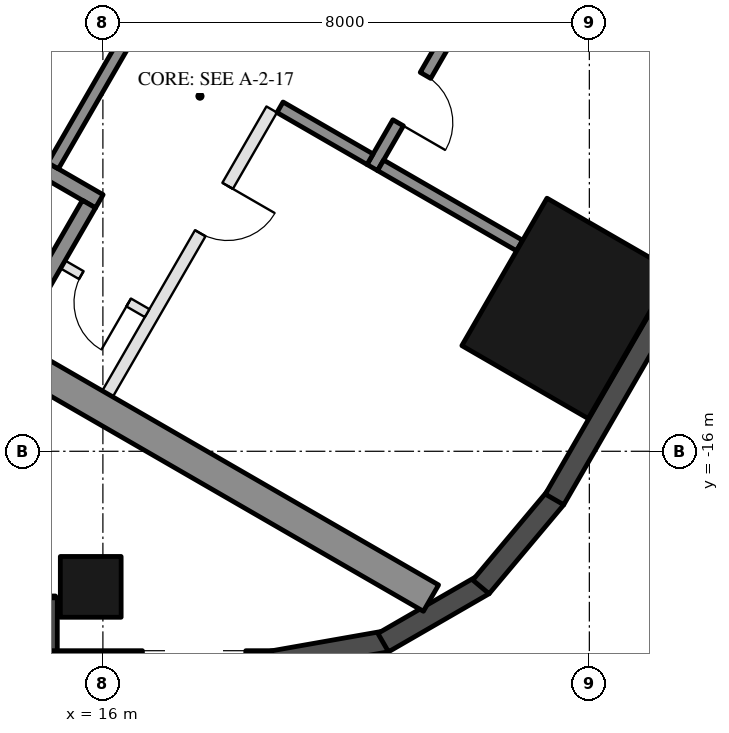
"""IFC4 building model, lengths in metres.
Left out: names, types, materials, properties, quantities, classifications, styles, units other than length and angle.
Written with IfcOpenShell. Run it as: python <this file> out.ifc"""

import sys

from ifc_helpers import new_model, si_unit, direction, frame, frame_2d, origin, origin_2d, place, context, subcontext, project, spatial, rectangle, hollow_rectangle, extrude, element, fill, save


model = new_model("IFC4")
c1 = context("Model", 3, precision=1e-05, world=origin(), true_north=direction((0.0, 1.0)))
c2 = subcontext(c1, "Body", "Model", "MODEL_VIEW")
j1 = project(units=[si_unit("LENGTHUNIT", "METRE"), si_unit("PLANEANGLEUNIT", "RADIAN")], contexts=[c1])
p1 = place(None, origin())
s1 = spatial("IfcSite", under=j1, at=p1, CompositionType="ELEMENT")
p2 = place(p1, origin())
s2 = spatial("IfcBuilding", under=s1, at=p2, CompositionType="ELEMENT")
p3 = place(p2, frame((0.0, 0.0, 83.5)))
s3 = spatial("IfcBuildingStorey", under=s2, at=p3, CompositionType="ELEMENT", Elevation=83.5)
p4 = place(p3, frame((15.8, -18.23, 0.0), z_axis=(0.0, 0.0, 1.0), x_axis=(-1.0, 0.0, 0.0)))
e1 = element("IfcColumn", 1, at=p4, inside=s3, PredefinedType="COLUMN", context=c2, shape_type="SweptSolid", body=[
    extrude(hollow_rectangle(XDim=1.0, YDim=1.0, WallThickness=0.045, at=origin_2d()), origin(), (0.0, 0.0, 1.0), 3.7),
])
p5 = place(p3, frame((23.643, -13.65, 0.0), z_axis=(0.0, 0.0, 1.0), x_axis=(0.5, 0.866025403784, 0.0)))
e2 = element("IfcColumn", 2, at=p5, inside=s3, PredefinedType="COLUMN", context=c2, shape_type="SweptSolid", body=[
    extrude(hollow_rectangle(XDim=2.8, YDim=2.4, WallThickness=0.07, at=origin_2d()), origin(), (0.0, 0.0, 1.0), 3.7),
])
p6 = place(p3, frame((8.48, -18.555, 0.0), z_axis=(0.0, 0.0, 1.0), x_axis=(1.0, 0.0, 0.0)))
e3 = element("IfcWall", 3, at=p6, inside=s3, PredefinedType="SOLIDWALL", context=c2, shape_type="SweptSolid", body=[
    extrude(rectangle(XDim=6.74, YDim=0.35, at=frame_2d((3.37, 0.0))), origin(), (0.0, 0.0, 1.0), 3.55),
])
p7 = place(p6, frame((3.57, 0.0, 0.0)))
e4 = element("IfcOpeningElement", 4, at=p7, cuts=e3, PredefinedType="OPENING", context=c2, shape_type="SweptSolid", body=[
    extrude(rectangle(XDim=2.4, YDim=2.4, at=frame_2d((1.2, 1.2))), frame((0.0, 0.185, 0.0), z_axis=(0.0, -1.0, 0.0), x_axis=(1.0, 0.0, 0.0)), (0.0, 0.0, 1.0), 0.37),
])
p8 = place(p6, frame((0.77, 0.0, 0.3)))
e5 = element("IfcOpeningElement", 5, at=p8, cuts=e3, PredefinedType="OPENING", context=c2, shape_type="SweptSolid", body=[
    extrude(rectangle(XDim=2.5, YDim=2.65, at=frame_2d((1.25, 1.325))), frame((0.0, 0.185, 0.0), z_axis=(0.0, -1.0, 0.0), x_axis=(1.0, 0.0, 0.0)), (0.0, 0.0, 1.0), 0.37),
])
p9 = place(p3, frame((15.075, -18.41, 0.0), z_axis=(0.0, 0.0, 1.0), x_axis=(0.0, -1.0, 0.0)))
e6 = element("IfcWall", 6, at=p9, inside=s3, PredefinedType="SOLIDWALL", context=c2, shape_type="SweptSolid", body=[
    extrude(rectangle(XDim=1.22, YDim=0.35, at=frame_2d((0.61, 0.0))), origin(), (0.0, 0.0, 1.0), 3.55),
])
p10 = place(p3, frame((14.9, -19.455, 0.0), z_axis=(0.0, 0.0, 1.0), x_axis=(1.0, 0.0, 0.0)))
e7 = element("IfcWall", 7, at=p10, inside=s3, PredefinedType="SOLIDWALL", context=c2, shape_type="SweptSolid", body=[
    extrude(rectangle(XDim=3.916, YDim=0.35, at=frame_2d((1.958, 0.0))), origin(), (0.0, 0.0, 1.0), 3.55),
])
p11 = place(p10, frame((1.75, 0.0, 0.3)))
e8 = element("IfcOpeningElement", 8, at=p11, cuts=e7, PredefinedType="OPENING", context=c2, shape_type="SweptSolid", body=[
    extrude(rectangle(XDim=1.7, YDim=2.65, at=frame_2d((0.85, 1.325))), frame((0.0, 0.185, 0.0), z_axis=(0.0, -1.0, 0.0), x_axis=(1.0, 0.0, 0.0)), (0.0, 0.0, 1.0), 0.37),
])
p12 = place(p3, frame((18.785, -19.458, 0.0), z_axis=(0.0, 0.0, 1.0), x_axis=(0.984798995425, 0.173697837091, 0.0)))
e9 = element("IfcWall", 9, at=p12, inside=s3, PredefinedType="SOLIDWALL", context=c2, shape_type="SweptSolid", body=[
    extrude(rectangle(XDim=1.91, YDim=0.35, at=frame_2d((0.955, 0.0))), origin(), (0.0, 0.0, 1.0), 3.55),
])
for number, where, z_axis, x_axis in (
    (10, (20.61, -19.147, 0.0), (0.0, 0.0, 1.0), (0.866, 0.5, 0.0)),
    (11, (22.217, -18.231, 0.0), (0.0, 0.0, 1.0), (0.643, 0.766, 0.0)),
):
    element("IfcWall", number, at=place(p3, frame(where, z_axis=z_axis, x_axis=x_axis)), inside=s3, PredefinedType="SOLIDWALL", context=c2, shape_type="SweptSolid", body=[
        extrude(rectangle(XDim=1.91, YDim=0.35, at=frame_2d((0.955, 0.0))), origin(), (0.0, 0.0, 1.0), 3.55),
    ])
p13 = place(p3, frame((23.427, -16.792, 0.0), z_axis=(0.0, 0.0, 1.0), x_axis=(0.500018773155, 0.866014564827, 0.0)))
e12 = element("IfcWall", 12, at=p13, inside=s3, PredefinedType="SOLIDWALL", context=c2, shape_type="SweptSolid", body=[
    extrude(rectangle(XDim=5.658, YDim=0.35, at=frame_2d((2.829, 0.0))), origin(), (0.0, 0.0, 1.0), 3.55),
])
for number, where, z_axis, x_axis in (
    (13, (8.547, -10.997, 0.0), (0.0, 0.0, 1.0), (0.866, -0.5, 0.0)),
    (14, (13.797, -1.903, 0.0), (0.0, 0.0, 1.0), (0.866, -0.5, 0.0)),
):
    element("IfcWall", number, at=place(p3, frame(where, z_axis=z_axis, x_axis=x_axis)), inside=s3, PredefinedType="SHEAR", context=c2, shape_type="SweptSolid", body=[
        extrude(rectangle(XDim=14.837, YDim=0.5, at=frame_2d((7.418, 0.0))), origin(), (0.0, 0.0, 1.0), 3.5),
    ])
p14 = place(p3, frame((10.356, -8.664, 0.0), z_axis=(0.0, 0.0, 1.0), x_axis=(0.866028629588, -0.499994412703, 0.0)))
e15 = element("IfcWall", 15, at=p14, inside=s3, PredefinedType="SHEAR", context=c2, shape_type="SweptSolid", body=[
    extrude(rectangle(XDim=6.45, YDim=0.25, at=frame_2d((3.225, 0.0))), origin(), (0.0, 0.0, 1.0), 3.5),
])
p15 = place(p14, frame((0.3, 0.0, 0.0)))
e16 = element("IfcOpeningElement", 16, at=p15, cuts=e15, PredefinedType="OPENING", context=c2, shape_type="SweptSolid", body=[
    extrude(rectangle(XDim=1.0, YDim=2.1, at=frame_2d((0.5, 1.05))), frame((0.0, 0.135, 0.0), z_axis=(0.0, -1.0, 0.0), x_axis=(1.0, 0.0, 0.0)), (0.0, 0.0, 1.0), 0.27),
])
p16 = place(p3, frame((14.496, -14.143, 0.0), z_axis=(0.0, 0.0, 1.0), x_axis=(0.500062241894, 0.865989465428, 0.0)))
e17 = element("IfcWall", 17, at=p16, inside=s3, PredefinedType="SHEAR", context=c2, shape_type="SweptSolid", body=[
    extrude(rectangle(XDim=2.55, YDim=0.25, at=frame_2d((1.275, 0.0))), origin(), (0.0, 0.0, 1.0), 3.5),
])
p17 = place(p3, frame((15.181, -11.305, 0.0), z_axis=(0.0, 0.0, 1.0), x_axis=(0.49994636267, 0.866056369097, 0.0)))
e18 = element("IfcWall", 18, at=p17, inside=s3, PredefinedType="SHEAR", context=c2, shape_type="SweptSolid", body=[
    extrude(rectangle(XDim=2.8, YDim=0.2, at=frame_2d((1.4, 0.0))), origin(), (0.0, 0.0, 1.0), 3.5),
])
p18 = place(p3, frame((20.43, -11.333, 0.0), z_axis=(0.0, 0.0, 1.0), x_axis=(0.500001309137, 0.866024647952, 0.0)))
e19 = element("IfcWall", 19, at=p18, inside=s3, PredefinedType="SHEAR", context=c2, shape_type="SweptSolid", body=[
    extrude(rectangle(XDim=2.4, YDim=0.2, at=frame_2d((1.2, 0.0))), origin(), (0.0, 0.0, 1.0), 3.5),
])
p19 = place(p18, frame((0.85, 0.0, 0.0)))
e20 = element("IfcOpeningElement", 20, at=p19, cuts=e19, PredefinedType="OPENING", context=c2, shape_type="SweptSolid", body=[
    extrude(rectangle(XDim=0.9, YDim=2.1, at=frame_2d((0.45, 1.05))), frame((0.0, 0.11, 0.0), z_axis=(0.0, -1.0, 0.0), x_axis=(1.0, 0.0, 0.0)), (0.0, 0.0, 1.0), 0.22),
])
p20 = place(p3, frame((18.913, -10.342, 0.0), z_axis=(0.0, 0.0, 1.0), x_axis=(0.866038183914, -0.499977863513, 0.0)))
e21 = element("IfcWall", 21, at=p20, inside=s3, PredefinedType="SHEAR", context=c2, shape_type="SweptSolid", body=[
    extrude(rectangle(XDim=1.71, YDim=0.2, at=frame_2d((0.855, 0.0))), origin(), (0.0, 0.0, 1.0), 3.5),
])
p21 = place(p3, frame((20.567, -11.297, 0.0), z_axis=(0.0, 0.0, 1.0), x_axis=(0.866060851709, -0.499938597367, 0.0)))
e22 = element("IfcWall", 22, at=p21, inside=s3, PredefinedType="SHEAR", context=c2, shape_type="SweptSolid", body=[
    extrude(rectangle(XDim=2.64, YDim=0.2, at=frame_2d((1.32, 0.0))), origin(), (0.0, 0.0, 1.0), 3.5),
])
p22 = place(p3, frame((16.076, -15.055, 0.0), z_axis=(0.0, 0.0, 1.0), x_axis=(0.499995103361, 0.866028230842, 0.0)))
e23 = element("IfcWall", 23, at=p22, inside=s3, PredefinedType="PARTITIONING", context=c2, shape_type="SweptSolid", body=[
    extrude(rectangle(XDim=5.4, YDim=0.2, at=frame_2d((2.7, 0.0))), origin(), (0.0, 0.0, 1.0), 3.5),
])
p23 = place(p22, frame((3.05, 0.0, 0.0)))
e24 = element("IfcOpeningElement", 24, at=p23, cuts=e23, PredefinedType="OPENING", context=c2, shape_type="SweptSolid", body=[
    extrude(rectangle(XDim=0.9, YDim=2.1, at=frame_2d((0.45, 1.05))), frame((0.0, 0.11, 0.0), z_axis=(0.0, -1.0, 0.0), x_axis=(1.0, 0.0, 0.0)), (0.0, 0.0, 1.0), 0.22),
])
p24 = place(p3, frame((15.342, -12.928, 0.0), z_axis=(0.0, 0.0, 1.0), x_axis=(0.865989903783, -0.500061482766, 0.0)))
e25 = element("IfcWall", 25, at=p24, inside=s3, PredefinedType="PARTITIONING", context=c2, shape_type="SweptSolid", body=[
    extrude(rectangle(XDim=1.6, YDim=0.15, at=frame_2d((0.8, 0.0))), origin(), (0.0, 0.0, 1.0), 3.5),
])
p25 = place(p24, frame((0.35, 0.0, 0.0)))
e26 = element("IfcOpeningElement", 26, at=p25, cuts=e25, PredefinedType="OPENING", context=c2, shape_type="SweptSolid", body=[
    extrude(rectangle(XDim=0.9, YDim=2.1, at=frame_2d((0.45, 1.05))), frame((0.0, 0.085, 0.0), z_axis=(0.0, -1.0, 0.0), x_axis=(1.0, 0.0, 0.0)), (0.0, 0.0, 1.0), 0.17),
])
p26 = place(p25, frame((0.9, 0.0, 0.0), z_axis=(0.0, 0.0, 1.0), x_axis=(-1.0, 0.0, 0.0)))
e27 = element("IfcDoor", 27, at=p26, inside=s3, OperationType="SINGLE_SWING_LEFT", PredefinedType="DOOR", context=c2, shape_type="SweptSolid", body=[
    extrude(rectangle(XDim=0.9, YDim=2.1, at=frame_2d((0.45, 1.05))), frame((0.0, 0.025, 0.0), z_axis=(0.0, -1.0, 0.0), x_axis=(1.0, 0.0, 0.0)), (0.0, 0.0, 1.0), 0.05),
])
fill(e26, e27)
p27 = place(p19, frame((0.9, 0.0, 0.0), z_axis=(0.0, 0.0, 1.0), x_axis=(-1.0, 0.0, 0.0)))
e28 = element("IfcDoor", 28, at=p27, inside=s3, OperationType="SINGLE_SWING_RIGHT", PredefinedType="DOOR", context=c2, shape_type="SweptSolid", body=[
    extrude(rectangle(XDim=0.9, YDim=2.1, at=frame_2d((0.45, 1.05))), frame((0.0, 0.025, 0.0), z_axis=(0.0, -1.0, 0.0), x_axis=(1.0, 0.0, 0.0)), (0.0, 0.0, 1.0), 0.05),
])
fill(e20, e28)
p28 = place(p23, frame((0.9, 0.0, 0.0), z_axis=(0.0, 0.0, 1.0), x_axis=(-1.0, 0.0, 0.0)))
e29 = element("IfcDoor", 29, at=p28, inside=s3, OperationType="SINGLE_SWING_LEFT", PredefinedType="DOOR", context=c2, shape_type="SweptSolid", body=[
    extrude(rectangle(XDim=0.9, YDim=2.1, at=frame_2d((0.45, 1.05))), frame((0.0, 0.025, 0.0), z_axis=(0.0, -1.0, 0.0), x_axis=(1.0, 0.0, 0.0)), (0.0, 0.0, 1.0), 0.05),
])
fill(e24, e29)
save(model, sys.argv[1])
